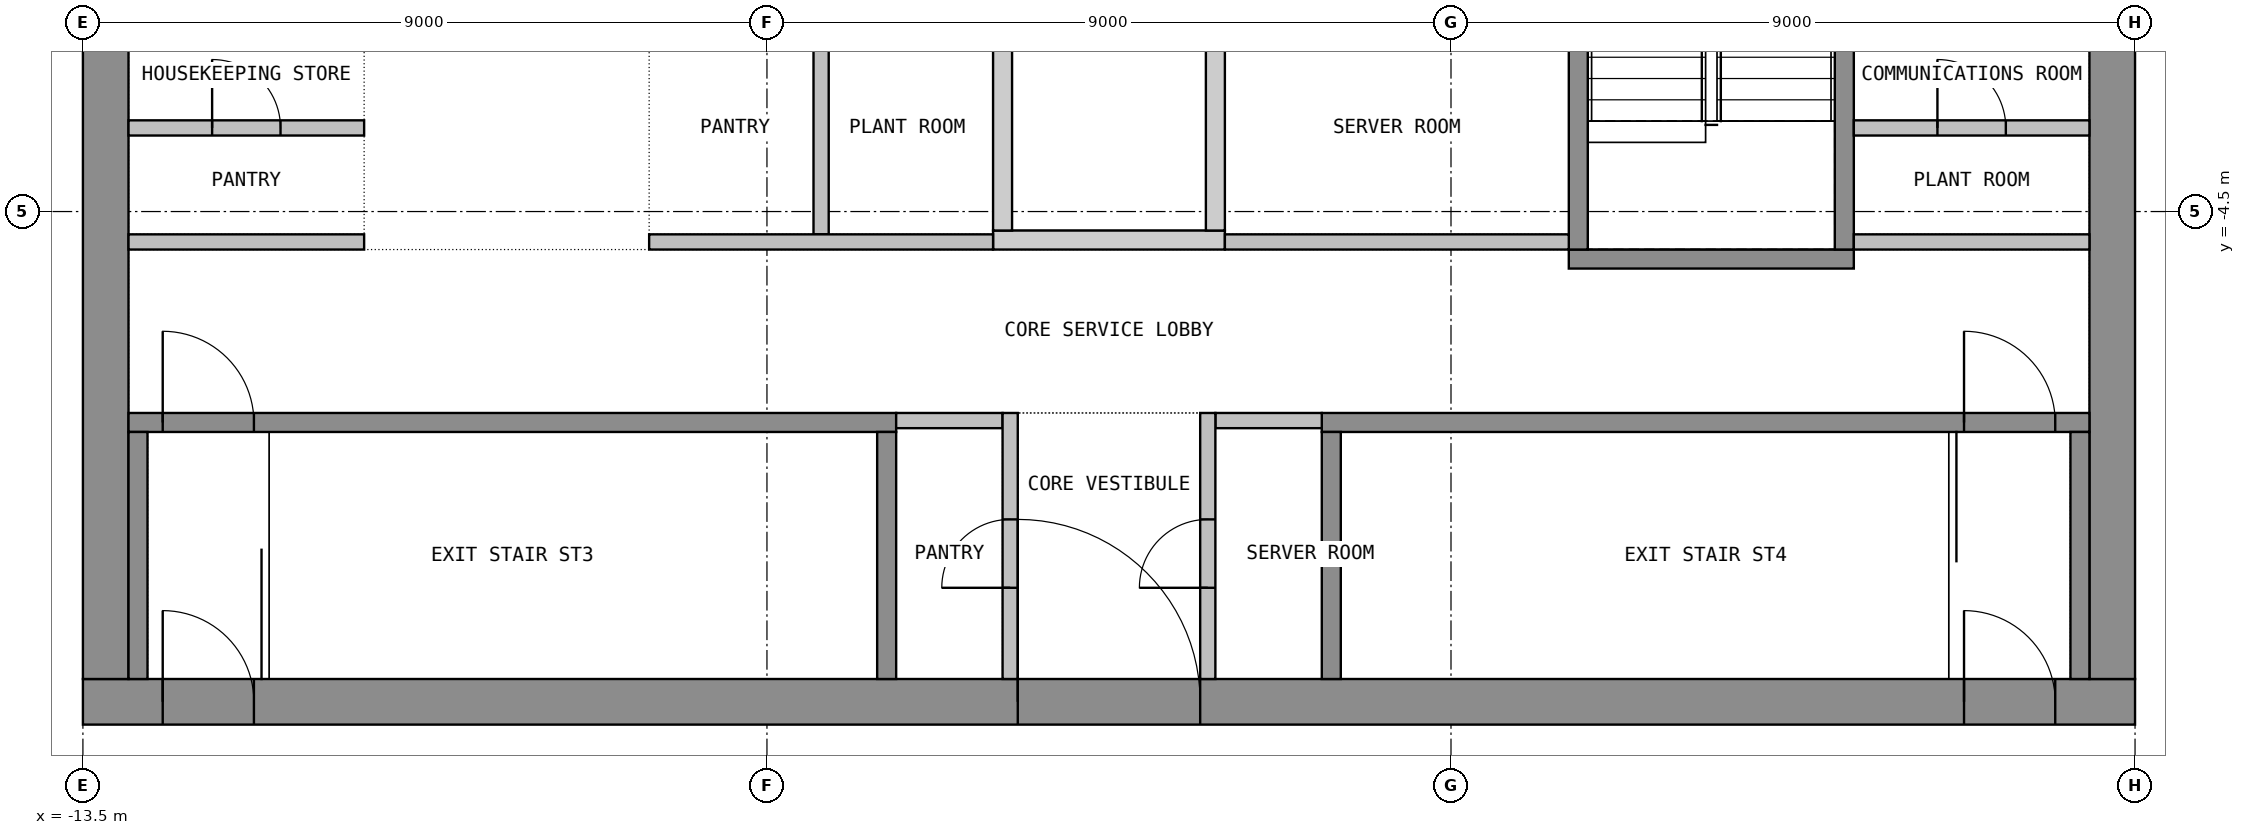
"""IFC4 building model, lengths in metres.
Left out: names, types, materials, properties, quantities, classifications, styles, units other than length and angle.
Written with IfcOpenShell. Run it as: python <this file> out.ifc"""

import sys

from ifc_helpers import new_model, si_unit, direction, frame, frame_2d, origin, place, context, subcontext, project, spatial, polyline, rectangle, outline, extrude, element, fill, save


model = new_model("IFC4")
c1 = context("Model", 3, precision=1e-05, world=origin(), true_north=direction((0.0, 1.0)))
c2 = subcontext(c1, "Body", "Model", "MODEL_VIEW")
j1 = project(units=[si_unit("LENGTHUNIT", "METRE"), si_unit("PLANEANGLEUNIT", "RADIAN")], contexts=[c1])
p1 = place(None, origin())
s1 = spatial("IfcSite", under=j1, at=p1, CompositionType="ELEMENT")
p2 = place(p1, origin())
s2 = spatial("IfcBuilding", under=s1, at=p2, CompositionType="ELEMENT")
p3 = place(p2, frame((0.0, 0.0, 318.9)))
s3 = spatial("IfcBuildingStorey", under=s2, at=p3, CompositionType="ELEMENT", Elevation=318.9)
p4 = place(p3, frame((-13.5, -10.95, 0.0), z_axis=(0.0, 0.0, 1.0), x_axis=(1.0, 0.0, 0.0)))
e1 = element("IfcWall", 1, at=p4, inside=s3, PredefinedType="SHEAR", context=c2, shape_type="SweptSolid", body=[
    extrude(rectangle(XDim=27.0, YDim=0.6, at=frame_2d((13.5, 0.0))), origin(), (0.0, 0.0, 1.0), 3.6),
])
p5 = place(p4, frame((12.3, 0.0, 0.0)))
e2 = element("IfcOpeningElement", 2, at=p5, cuts=e1, PredefinedType="OPENING", context=c2, shape_type="SweptSolid", body=[
    extrude(rectangle(XDim=2.4, YDim=2.1, at=frame_2d((1.2, 1.05))), frame((0.0, 0.31, 0.0), z_axis=(0.0, -1.0, 0.0), x_axis=(1.0, 0.0, 0.0)), (0.0, 0.0, 1.0), 0.62),
])
p6 = place(p4, frame((1.05, 0.0, 0.0)))
e3 = element("IfcOpeningElement", 3, at=p6, cuts=e1, PredefinedType="OPENING", context=c2, shape_type="SweptSolid", body=[
    extrude(rectangle(XDim=1.2, YDim=2.1, at=frame_2d((0.6, 1.05))), frame((0.0, 0.31, 0.0), z_axis=(0.0, -1.0, 0.0), x_axis=(1.0, 0.0, 0.0)), (0.0, 0.0, 1.0), 0.62),
])
p7 = place(p4, frame((24.75, 0.0, 0.0)))
e4 = element("IfcOpeningElement", 4, at=p7, cuts=e1, PredefinedType="OPENING", context=c2, shape_type="SweptSolid", body=[
    extrude(rectangle(XDim=1.2, YDim=2.1, at=frame_2d((0.6, 1.05))), frame((0.0, 0.31, 0.0), z_axis=(0.0, -1.0, 0.0), x_axis=(1.0, 0.0, 0.0)), (0.0, 0.0, 1.0), 0.62),
])
p8 = place(p3, frame((-13.2, -10.65, 0.0), z_axis=(0.0, 0.0, 1.0), x_axis=(0.0, 1.0, 0.0)))
e5 = element("IfcWall", 5, at=p8, inside=s3, PredefinedType="SHEAR", context=c2, shape_type="SweptSolid", body=[
    extrude(rectangle(XDim=21.3, YDim=0.6, at=frame_2d((10.65, 0.0))), origin(), (0.0, 0.0, 1.0), 3.6),
])
p9 = place(p8, frame((9.45, 0.0, 0.0)))
e6 = element("IfcOpeningElement", 6, at=p9, cuts=e5, PredefinedType="OPENING", context=c2, shape_type="SweptSolid", body=[
    extrude(rectangle(XDim=2.4, YDim=2.1, at=frame_2d((1.2, 1.05))), frame((0.0, 0.31, 0.0), z_axis=(0.0, -1.0, 0.0), x_axis=(1.0, 0.0, 0.0)), (0.0, 0.0, 1.0), 0.62),
])
p10 = place(p3, frame((13.2, -10.65, 0.0), z_axis=(0.0, 0.0, 1.0), x_axis=(0.0, 1.0, 0.0)))
e7 = element("IfcWall", 7, at=p10, inside=s3, PredefinedType="SHEAR", context=c2, shape_type="SweptSolid", body=[
    extrude(rectangle(XDim=21.3, YDim=0.6, at=frame_2d((10.65, 0.0))), origin(), (0.0, 0.0, 1.0), 3.6),
])
p11 = place(p10, frame((9.45, 0.0, 0.0)))
e8 = element("IfcOpeningElement", 8, at=p11, cuts=e7, PredefinedType="OPENING", context=c2, shape_type="SweptSolid", body=[
    extrude(rectangle(XDim=2.4, YDim=2.1, at=frame_2d((1.2, 1.05))), frame((0.0, 0.31, 0.0), z_axis=(0.0, -1.0, 0.0), x_axis=(1.0, 0.0, 0.0)), (0.0, 0.0, 1.0), 0.62),
])
p12 = place(p3, origin())
e9 = element("IfcWall", 9, at=p12, inside=s3, PredefinedType="SHEAR", context=c2, shape_type="SweptSolid", body=[
    extrude(outline(polyline([(-1.525, -5.0), (1.525, -5.0), (1.525, -4.75), (-1.525, -4.75), (-1.525, -5.0)])), origin(), (0.0, 0.0, 1.0), 3.6),
])
p13 = place(p3, origin())
e10 = element("IfcWall", 10, at=p13, inside=s3, PredefinedType="SHEAR", context=c2, shape_type="SweptSolid", body=[
    extrude(outline(polyline([(-1.525, -4.75), (-1.275, -4.75), (-1.275, -2.05), (-1.525, -2.05), (-1.525, -4.75)])), origin(), (0.0, 0.0, 1.0), 3.6),
])
p14 = place(p3, origin())
e11 = element("IfcWall", 11, at=p14, inside=s3, PredefinedType="SHEAR", context=c2, shape_type="SweptSolid", body=[
    extrude(outline(polyline([(1.275, -4.75), (1.525, -4.75), (1.525, -2.05), (1.275, -2.05), (1.275, -4.75)])), origin(), (0.0, 0.0, 1.0), 3.6),
])
p15 = place(p3, frame((-12.9, -7.275, 0.0), z_axis=(0.0, 0.0, 1.0), x_axis=(1.0, 0.0, 0.0)))
e12 = element("IfcWall", 12, at=p15, inside=s3, PredefinedType="SHEAR", context=c2, shape_type="SweptSolid", body=[
    extrude(rectangle(XDim=10.1, YDim=0.25, at=frame_2d((5.05, 0.0))), origin(), (0.0, 0.0, 1.0), 3.6),
])
p16 = place(p15, frame((0.45, 0.0, 0.0)))
e13 = element("IfcOpeningElement", 13, at=p16, cuts=e12, PredefinedType="OPENING", context=c2, shape_type="SweptSolid", body=[
    extrude(rectangle(XDim=1.2, YDim=2.1, at=frame_2d((0.6, 1.05))), frame((0.0, 0.135, 0.0), z_axis=(0.0, -1.0, 0.0), x_axis=(1.0, 0.0, 0.0)), (0.0, 0.0, 1.0), 0.27),
])
for number, where, z_axis, x_axis in (
    (14, (-12.775, -10.65, 0.0), (0.0, 0.0, 1.0), (0.0, 1.0, 0.0)),
    (15, (-2.925, -10.65, 0.0), (0.0, 0.0, 1.0), (0.0, 1.0, 0.0)),
):
    element("IfcWall", number, at=place(p3, frame(where, z_axis=z_axis, x_axis=x_axis)), inside=s3, PredefinedType="SHEAR", context=c2, shape_type="SweptSolid", body=[
        extrude(rectangle(XDim=3.25, YDim=0.25, at=frame_2d((1.625, 0.0))), origin(), (0.0, 0.0, 1.0), 3.6),
    ])
p17 = place(p3, frame((2.8, -7.275, 0.0), z_axis=(0.0, 0.0, 1.0), x_axis=(1.0, 0.0, 0.0)))
e16 = element("IfcWall", 16, at=p17, inside=s3, PredefinedType="SHEAR", context=c2, shape_type="SweptSolid", body=[
    extrude(rectangle(XDim=10.1, YDim=0.25, at=frame_2d((5.05, 0.0))), origin(), (0.0, 0.0, 1.0), 3.6),
])
p18 = place(p17, frame((8.45, 0.0, 0.0)))
e17 = element("IfcOpeningElement", 17, at=p18, cuts=e16, PredefinedType="OPENING", context=c2, shape_type="SweptSolid", body=[
    extrude(rectangle(XDim=1.2, YDim=2.1, at=frame_2d((0.6, 1.05))), frame((0.0, 0.135, 0.0), z_axis=(0.0, -1.0, 0.0), x_axis=(1.0, 0.0, 0.0)), (0.0, 0.0, 1.0), 0.27),
])
for number, where, z_axis, x_axis in (
    (18, (2.925, -10.65, 0.0), (0.0, 0.0, 1.0), (0.0, 1.0, 0.0)),
    (19, (12.775, -10.65, 0.0), (0.0, 0.0, 1.0), (0.0, 1.0, 0.0)),
):
    element("IfcWall", number, at=place(p3, frame(where, z_axis=z_axis, x_axis=x_axis)), inside=s3, PredefinedType="SHEAR", context=c2, shape_type="SweptSolid", body=[
        extrude(rectangle(XDim=3.25, YDim=0.25, at=frame_2d((1.625, 0.0))), origin(), (0.0, 0.0, 1.0), 3.6),
    ])
p19 = place(p3, frame((6.05, -5.125, 0.0), z_axis=(0.0, 0.0, 1.0), x_axis=(1.0, 0.0, 0.0)))
e20 = element("IfcWall", 20, at=p19, inside=s3, PredefinedType="SHEAR", context=c2, shape_type="SweptSolid", body=[
    extrude(rectangle(XDim=3.75, YDim=0.25, at=frame_2d((1.875, 0.0))), origin(), (0.0, 0.0, 1.0), 3.6),
])
p20 = place(p3, frame((6.175, -5.0, 0.0), z_axis=(0.0, 0.0, 1.0), x_axis=(0.0, 1.0, 0.0)))
e21 = element("IfcWall", 21, at=p20, inside=s3, PredefinedType="SHEAR", context=c2, shape_type="SweptSolid", body=[
    extrude(rectangle(XDim=6.6, YDim=0.25, at=frame_2d((3.3, 0.0))), origin(), (0.0, 0.0, 1.0), 3.6),
])
p21 = place(p20, frame((5.2, 0.0, 0.0)))
e22 = element("IfcOpeningElement", 22, at=p21, cuts=e21, PredefinedType="OPENING", context=c2, shape_type="SweptSolid", body=[
    extrude(rectangle(XDim=1.2, YDim=2.1, at=frame_2d((0.6, 1.05))), frame((0.0, 0.135, 0.0), z_axis=(0.0, -1.0, 0.0), x_axis=(1.0, 0.0, 0.0)), (0.0, 0.0, 1.0), 0.27),
])
p22 = place(p3, frame((9.675, -5.0, 0.0), z_axis=(0.0, 0.0, 1.0), x_axis=(0.0, 1.0, 0.0)))
e23 = element("IfcWall", 23, at=p22, inside=s3, PredefinedType="SHEAR", context=c2, shape_type="SweptSolid", body=[
    extrude(rectangle(XDim=6.6, YDim=0.25, at=frame_2d((3.3, 0.0))), origin(), (0.0, 0.0, 1.0), 3.6),
])
for number, where, z_axis, x_axis in (
    (24, (-2.8, -7.25, 0.0), (0.0, 0.0, 1.0), (1.0, 0.0, 0.0)),
    (25, (1.4, -7.25, 0.0), (0.0, 0.0, 1.0), (1.0, 0.0, 0.0)),
):
    element("IfcWall", number, at=place(p3, frame(where, z_axis=z_axis, x_axis=x_axis)), inside=s3, PredefinedType="PARTITIONING", context=c2, shape_type="SweptSolid", body=[
        extrude(rectangle(XDim=1.4, YDim=0.2, at=frame_2d((0.7, 0.0))), origin(), (0.0, 0.0, 1.0), 3.6),
    ])
p23 = place(p3, frame((-1.3, -10.65, 0.0), z_axis=(0.0, 0.0, 1.0), x_axis=(0.0, 1.0, 0.0)))
e26 = element("IfcWall", 26, at=p23, inside=s3, PredefinedType="PARTITIONING", context=c2, shape_type="SweptSolid", body=[
    extrude(rectangle(XDim=3.5, YDim=0.2, at=frame_2d((1.75, 0.0))), origin(), (0.0, 0.0, 1.0), 3.6),
])
p24 = place(p23, frame((1.2, 0.0, 0.0)))
e27 = element("IfcOpeningElement", 27, at=p24, cuts=e26, PredefinedType="OPENING", context=c2, shape_type="SweptSolid", body=[
    extrude(rectangle(XDim=0.9, YDim=2.1, at=frame_2d((0.45, 1.05))), frame((0.0, 0.11, 0.0), z_axis=(0.0, -1.0, 0.0), x_axis=(1.0, 0.0, 0.0)), (0.0, 0.0, 1.0), 0.22),
])
p25 = place(p3, frame((1.3, -10.65, 0.0), z_axis=(0.0, 0.0, 1.0), x_axis=(0.0, 1.0, 0.0)))
e28 = element("IfcWall", 28, at=p25, inside=s3, PredefinedType="PARTITIONING", context=c2, shape_type="SweptSolid", body=[
    extrude(rectangle(XDim=3.5, YDim=0.2, at=frame_2d((1.75, 0.0))), origin(), (0.0, 0.0, 1.0), 3.6),
])
p26 = place(p25, frame((1.2, 0.0, 0.0)))
e29 = element("IfcOpeningElement", 29, at=p26, cuts=e28, PredefinedType="OPENING", context=c2, shape_type="SweptSolid", body=[
    extrude(rectangle(XDim=0.9, YDim=2.1, at=frame_2d((0.45, 1.05))), frame((0.0, 0.11, 0.0), z_axis=(0.0, -1.0, 0.0), x_axis=(1.0, 0.0, 0.0)), (0.0, 0.0, 1.0), 0.22),
])
p27 = place(p3, frame((-12.9, -3.4, 0.0), z_axis=(0.0, 0.0, 1.0), x_axis=(1.0, 0.0, 0.0)))
e30 = element("IfcWall", 30, at=p27, inside=s3, PredefinedType="PARTITIONING", context=c2, shape_type="SweptSolid", body=[
    extrude(rectangle(XDim=3.1, YDim=0.2, at=frame_2d((1.55, 0.0))), origin(), (0.0, 0.0, 1.0), 3.6),
])
p28 = place(p27, frame((1.1, 0.0, 0.0)))
e31 = element("IfcOpeningElement", 31, at=p28, cuts=e30, PredefinedType="OPENING", context=c2, shape_type="SweptSolid", body=[
    extrude(rectangle(XDim=0.9, YDim=2.1, at=frame_2d((0.45, 1.05))), frame((0.0, 0.11, 0.0), z_axis=(0.0, -1.0, 0.0), x_axis=(1.0, 0.0, 0.0)), (0.0, 0.0, 1.0), 0.22),
])
p29 = place(p3, frame((-12.9, -4.9, 0.0), z_axis=(0.0, 0.0, 1.0), x_axis=(1.0, 0.0, 0.0)))
e32 = element("IfcWall", 32, at=p29, inside=s3, PredefinedType="PARTITIONING", context=c2, shape_type="SweptSolid", body=[
    extrude(rectangle(XDim=3.1, YDim=0.2, at=frame_2d((1.55, 0.0))), origin(), (0.0, 0.0, 1.0), 3.6),
])
p30 = place(p3, frame((-3.788, -4.8, 0.0), z_axis=(0.0, 0.0, 1.0), x_axis=(0.0, 1.0, 0.0)))
e33 = element("IfcWall", 33, at=p30, inside=s3, PredefinedType="PARTITIONING", context=c2, shape_type="SweptSolid", body=[
    extrude(rectangle(XDim=2.8, YDim=0.2, at=frame_2d((1.4, 0.0))), origin(), (0.0, 0.0, 1.0), 3.6),
])
for number, where, z_axis, x_axis in (
    (34, (-6.05, -4.9, 0.0), (0.0, 0.0, 1.0), (1.0, 0.0, 0.0)),
    (35, (1.525, -4.9, 0.0), (0.0, 0.0, 1.0), (1.0, 0.0, 0.0)),
):
    element("IfcWall", number, at=place(p3, frame(where, z_axis=z_axis, x_axis=x_axis)), inside=s3, PredefinedType="PARTITIONING", context=c2, shape_type="SweptSolid", body=[
        extrude(rectangle(XDim=4.525, YDim=0.2, at=frame_2d((2.263, 0.0))), origin(), (0.0, 0.0, 1.0), 3.6),
    ])
p31 = place(p3, frame((9.8, -3.4, 0.0), z_axis=(0.0, 0.0, 1.0), x_axis=(1.0, 0.0, 0.0)))
e36 = element("IfcWall", 36, at=p31, inside=s3, PredefinedType="PARTITIONING", context=c2, shape_type="SweptSolid", body=[
    extrude(rectangle(XDim=3.1, YDim=0.2, at=frame_2d((1.55, 0.0))), origin(), (0.0, 0.0, 1.0), 3.6),
])
p32 = place(p31, frame((1.1, 0.0, 0.0)))
e37 = element("IfcOpeningElement", 37, at=p32, cuts=e36, PredefinedType="OPENING", context=c2, shape_type="SweptSolid", body=[
    extrude(rectangle(XDim=0.9, YDim=2.1, at=frame_2d((0.45, 1.05))), frame((0.0, 0.11, 0.0), z_axis=(0.0, -1.0, 0.0), x_axis=(1.0, 0.0, 0.0)), (0.0, 0.0, 1.0), 0.22),
])
p33 = place(p3, frame((9.8, -4.9, 0.0), z_axis=(0.0, 0.0, 1.0), x_axis=(1.0, 0.0, 0.0)))
e38 = element("IfcWall", 38, at=p33, inside=s3, PredefinedType="PARTITIONING", context=c2, shape_type="SweptSolid", body=[
    extrude(rectangle(XDim=3.1, YDim=0.2, at=frame_2d((1.55, 0.0))), origin(), (0.0, 0.0, 1.0), 3.6),
])
p34 = place(p5, origin())
e39 = element("IfcDoor", 39, at=p34, inside=s3, OperationType="DOUBLE_DOOR_DOUBLE_SWING", PredefinedType="DOOR", context=c2, shape_type="SweptSolid", body=[
    extrude(rectangle(XDim=2.4, YDim=2.1, at=frame_2d((1.2, 1.05))), frame((0.0, 0.025, 0.0), z_axis=(0.0, -1.0, 0.0), x_axis=(1.0, 0.0, 0.0)), (0.0, 0.0, 1.0), 0.05),
])
fill(e2, e39)
p35 = place(p6, origin())
e40 = element("IfcDoor", 40, at=p35, inside=s3, OperationType="SINGLE_SWING_RIGHT", PredefinedType="DOOR", context=c2, shape_type="SweptSolid", body=[
    extrude(rectangle(XDim=1.2, YDim=2.1, at=frame_2d((0.6, 1.05))), frame((0.0, 0.025, 0.0), z_axis=(0.0, -1.0, 0.0), x_axis=(1.0, 0.0, 0.0)), (0.0, 0.0, 1.0), 0.05),
])
fill(e3, e40)
p36 = place(p7, origin())
e41 = element("IfcDoor", 41, at=p36, inside=s3, OperationType="SINGLE_SWING_RIGHT", PredefinedType="DOOR", context=c2, shape_type="SweptSolid", body=[
    extrude(rectangle(XDim=1.2, YDim=2.1, at=frame_2d((0.6, 1.05))), frame((0.0, 0.025, 0.0), z_axis=(0.0, -1.0, 0.0), x_axis=(1.0, 0.0, 0.0)), (0.0, 0.0, 1.0), 0.05),
])
fill(e4, e41)
p37 = place(p16, origin())
e42 = element("IfcDoor", 42, at=p37, inside=s3, OperationType="SINGLE_SWING_LEFT", PredefinedType="DOOR", context=c2, shape_type="SweptSolid", body=[
    extrude(rectangle(XDim=1.2, YDim=2.1, at=frame_2d((0.6, 1.05))), frame((0.0, 0.025, 0.0), z_axis=(0.0, -1.0, 0.0), x_axis=(1.0, 0.0, 0.0)), (0.0, 0.0, 1.0), 0.05),
])
fill(e13, e42)
p38 = place(p18, origin())
e43 = element("IfcDoor", 43, at=p38, inside=s3, OperationType="SINGLE_SWING_LEFT", PredefinedType="DOOR", context=c2, shape_type="SweptSolid", body=[
    extrude(rectangle(XDim=1.2, YDim=2.1, at=frame_2d((0.6, 1.05))), frame((0.0, 0.025, 0.0), z_axis=(0.0, -1.0, 0.0), x_axis=(1.0, 0.0, 0.0)), (0.0, 0.0, 1.0), 0.05),
])
fill(e17, e43)
p39 = place(p24, origin())
e44 = element("IfcDoor", 44, at=p39, inside=s3, OperationType="SINGLE_SWING_LEFT", PredefinedType="DOOR", context=c2, shape_type="SweptSolid", body=[
    extrude(rectangle(XDim=0.9, YDim=2.1, at=frame_2d((0.45, 1.05))), frame((0.0, 0.025, 0.0), z_axis=(0.0, -1.0, 0.0), x_axis=(1.0, 0.0, 0.0)), (0.0, 0.0, 1.0), 0.05),
])
fill(e27, e44)
p40 = place(p26, origin())
e45 = element("IfcDoor", 45, at=p40, inside=s3, OperationType="SINGLE_SWING_LEFT", PredefinedType="DOOR", context=c2, shape_type="SweptSolid", body=[
    extrude(rectangle(XDim=0.9, YDim=2.1, at=frame_2d((0.45, 1.05))), frame((0.0, 0.025, 0.0), z_axis=(0.0, -1.0, 0.0), x_axis=(1.0, 0.0, 0.0)), (0.0, 0.0, 1.0), 0.05),
])
fill(e29, e45)
p41 = place(p28, origin())
e46 = element("IfcDoor", 46, at=p41, inside=s3, OperationType="SINGLE_SWING_LEFT", PredefinedType="DOOR", context=c2, shape_type="SweptSolid", body=[
    extrude(rectangle(XDim=0.9, YDim=2.1, at=frame_2d((0.45, 1.05))), frame((0.0, 0.025, 0.0), z_axis=(0.0, -1.0, 0.0), x_axis=(1.0, 0.0, 0.0)), (0.0, 0.0, 1.0), 0.05),
])
fill(e31, e46)
p42 = place(p32, origin())
e47 = element("IfcDoor", 47, at=p42, inside=s3, OperationType="SINGLE_SWING_LEFT", PredefinedType="DOOR", context=c2, shape_type="SweptSolid", body=[
    extrude(rectangle(XDim=0.9, YDim=2.1, at=frame_2d((0.45, 1.05))), frame((0.0, 0.025, 0.0), z_axis=(0.0, -1.0, 0.0), x_axis=(1.0, 0.0, 0.0)), (0.0, 0.0, 1.0), 0.05),
])
fill(e37, e47)
save(model, sys.argv[1])
